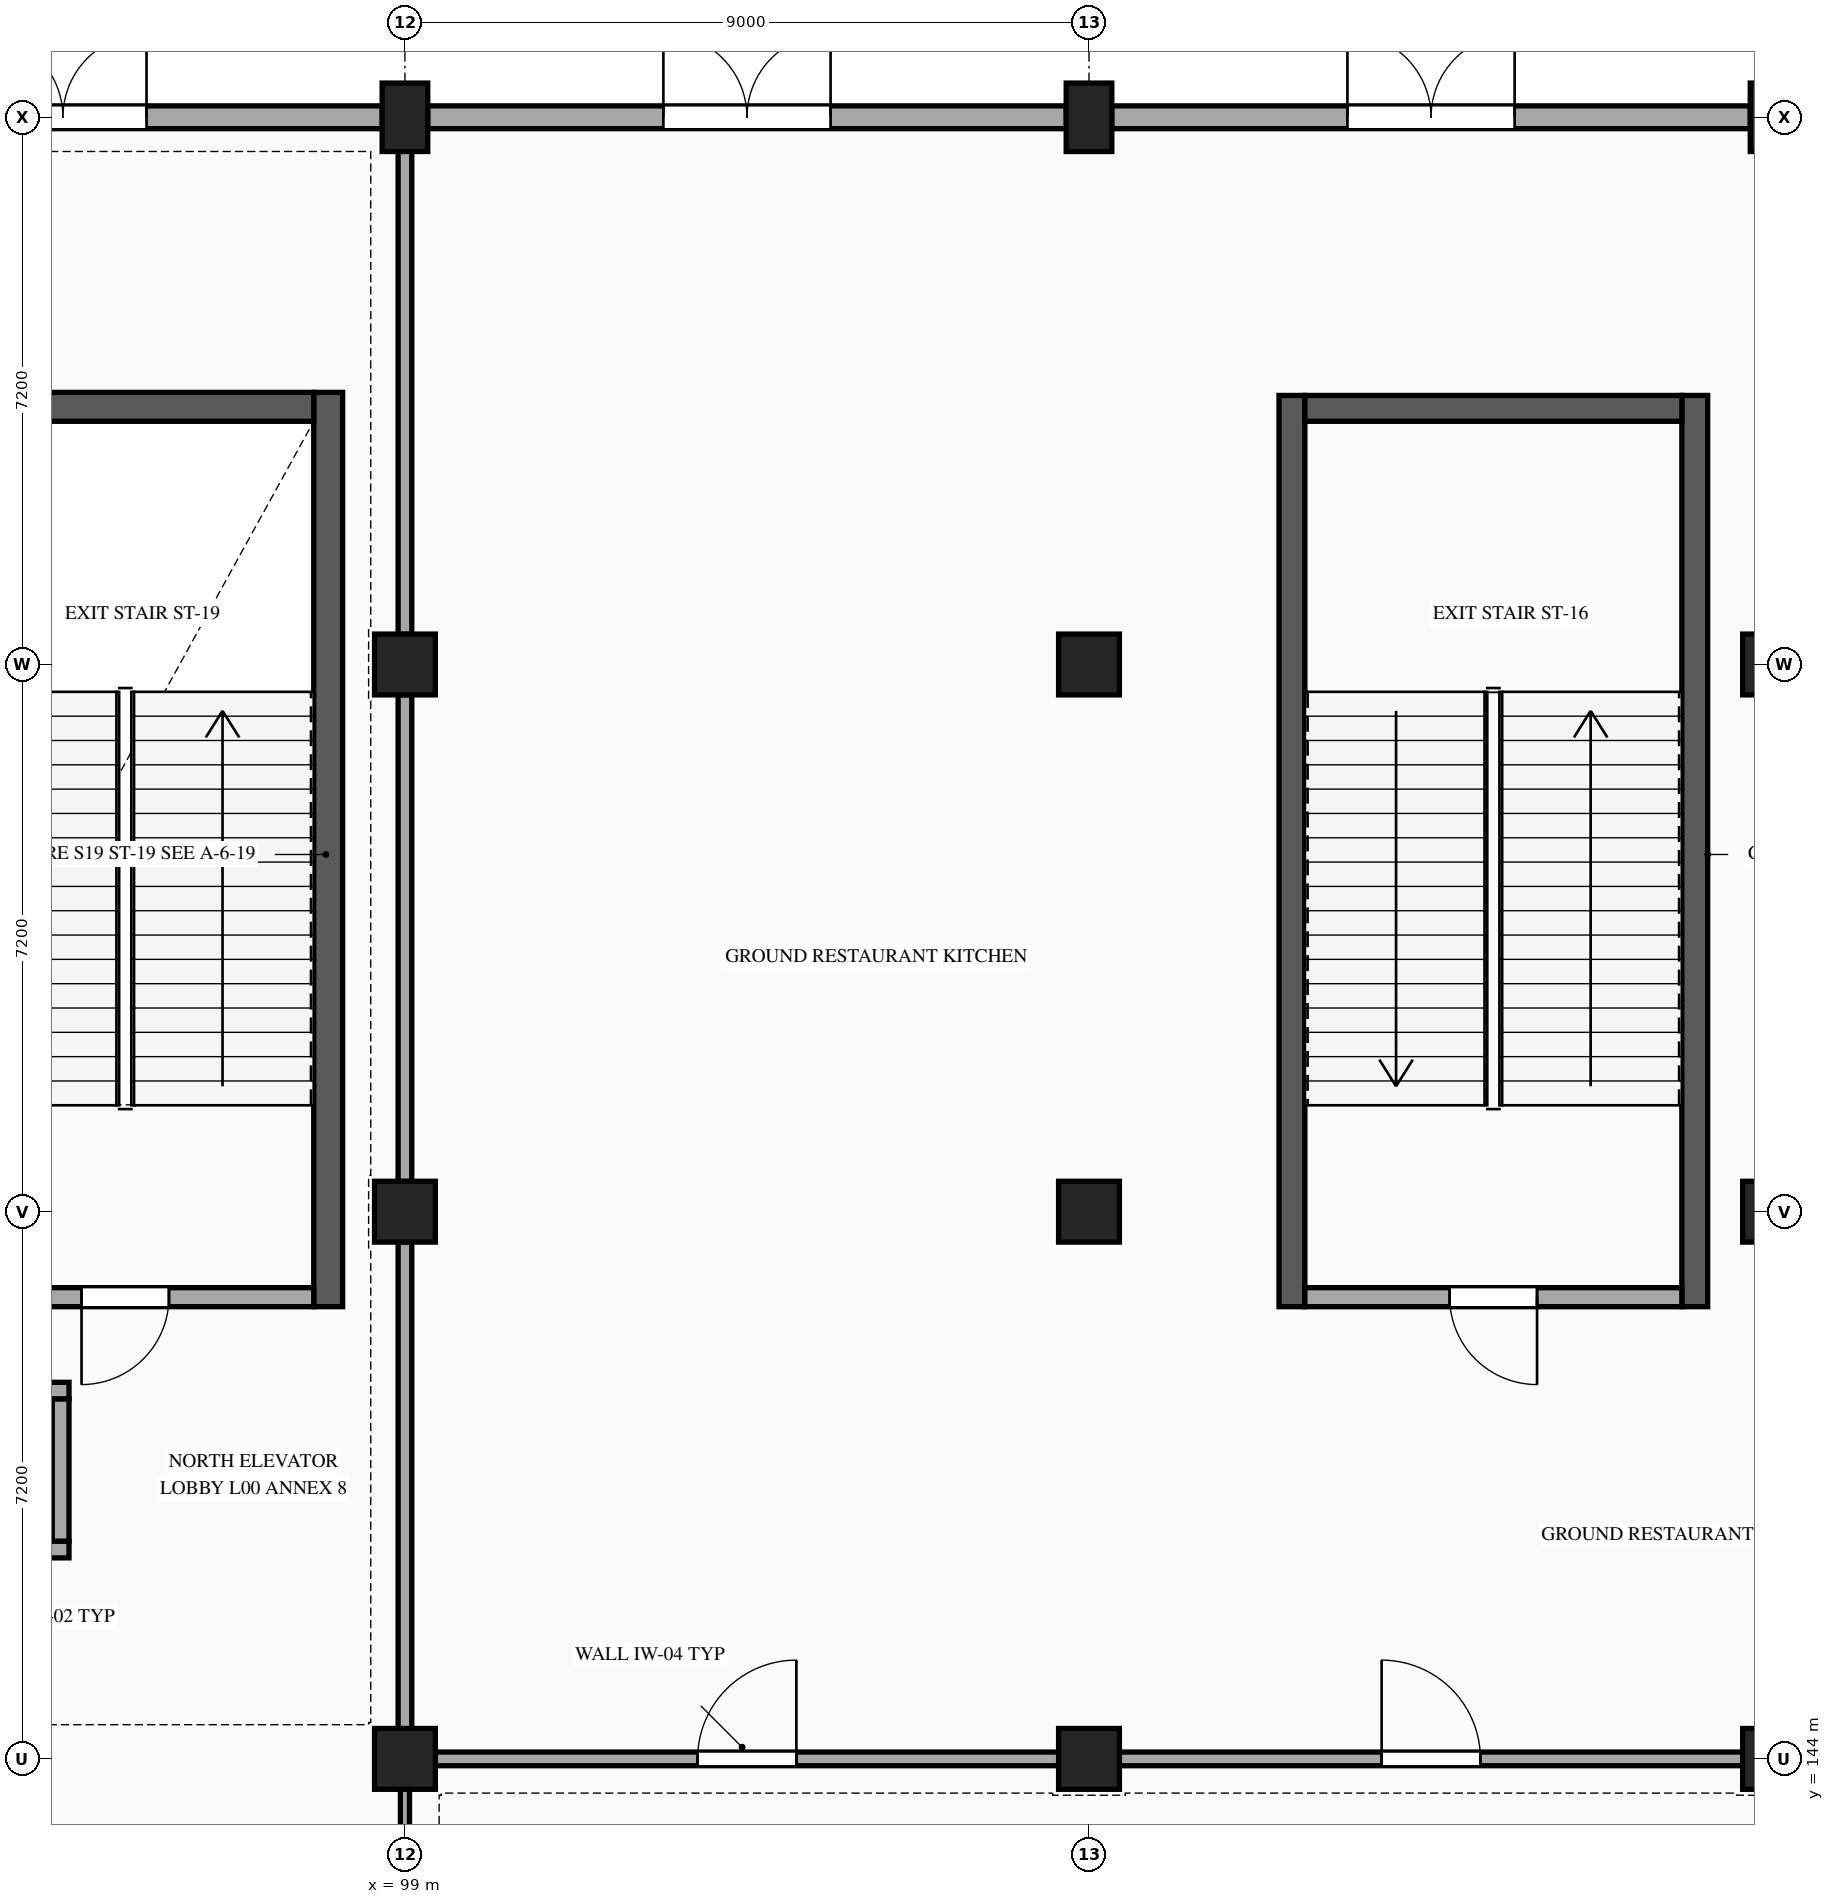
"""IFC4 building model, lengths in metres.
Left out: names, types, materials, properties, quantities, classifications, styles, units other than length and angle.
Written with IfcOpenShell. Run it as: python <this file> out.ifc"""

import sys

from ifc_helpers import new_model, si_unit, direction, frame, frame_2d, origin, origin_2d, place, context, subcontext, project, spatial, rectangle, extrude, element, fill, save


model = new_model("IFC4")
c1 = context("Model", 3, precision=1e-05, world=origin(), true_north=direction((0.0, 1.0)))
c2 = subcontext(c1, "Body", "Model", "MODEL_VIEW")
j1 = project(units=[si_unit("LENGTHUNIT", "METRE"), si_unit("PLANEANGLEUNIT", "RADIAN")], contexts=[c1])
p1 = place(None, origin())
s1 = spatial("IfcSite", under=j1, at=p1, CompositionType="ELEMENT")
p2 = place(p1, origin())
s2 = spatial("IfcBuilding", under=s1, at=p2, CompositionType="ELEMENT")
p3 = place(p2, origin())
s3 = spatial("IfcBuildingStorey", under=s2, at=p3, CompositionType="ELEMENT", Elevation=0.0)
for number, where, z_axis, x_axis in (
    (1, (99.0, 144.0, 0.0), (0.0, 0.0, 1.0), (1.0, 0.0, 0.0)),
    (2, (99.0, 151.2, 0.0), (0.0, 0.0, 1.0), (1.0, 0.0, 0.0)),
    (3, (99.0, 158.4, 0.0), (0.0, 0.0, 1.0), (1.0, 0.0, 0.0)),
):
    element("IfcColumn", number, at=place(p3, frame(where, z_axis=z_axis, x_axis=x_axis)), inside=s3, PredefinedType="COLUMN", context=c2, shape_type="SweptSolid", body=[
        extrude(rectangle(XDim=0.8, YDim=0.8, at=origin_2d()), origin(), (0.0, 0.0, 1.0), 5.4),
    ])
p4 = place(p3, frame((99.0, 165.6, 0.0), z_axis=(0.0, 0.0, 1.0), x_axis=(1.0, 0.0, 0.0)))
e4 = element("IfcColumn", 4, at=p4, inside=s3, PredefinedType="COLUMN", context=c2, shape_type="SweptSolid", body=[
    extrude(rectangle(XDim=0.6, YDim=0.9, at=origin_2d()), origin(), (0.0, 0.0, 1.0), 5.4),
])
for number, where, z_axis, x_axis in (
    (5, (108.0, 144.0, 0.0), (0.0, 0.0, 1.0), (1.0, 0.0, 0.0)),
    (6, (108.0, 151.2, 0.0), (0.0, 0.0, 1.0), (1.0, 0.0, 0.0)),
    (7, (108.0, 158.4, 0.0), (0.0, 0.0, 1.0), (1.0, 0.0, 0.0)),
):
    element("IfcColumn", number, at=place(p3, frame(where, z_axis=z_axis, x_axis=x_axis)), inside=s3, PredefinedType="COLUMN", context=c2, shape_type="SweptSolid", body=[
        extrude(rectangle(XDim=0.8, YDim=0.8, at=origin_2d()), origin(), (0.0, 0.0, 1.0), 5.4),
    ])
p5 = place(p3, frame((108.0, 165.6, 0.0), z_axis=(0.0, 0.0, 1.0), x_axis=(1.0, 0.0, 0.0)))
e8 = element("IfcColumn", 8, at=p5, inside=s3, PredefinedType="COLUMN", context=c2, shape_type="SweptSolid", body=[
    extrude(rectangle(XDim=0.6, YDim=0.9, at=origin_2d()), origin(), (0.0, 0.0, 1.0), 5.4),
])
for number, where, z_axis, x_axis in (
    (9, (117.0, 144.0, 0.0), (0.0, 0.0, 1.0), (1.0, 0.0, 0.0)),
    (10, (117.0, 151.2, 0.0), (0.0, 0.0, 1.0), (1.0, 0.0, 0.0)),
    (11, (117.0, 158.4, 0.0), (0.0, 0.0, 1.0), (1.0, 0.0, 0.0)),
):
    element("IfcColumn", number, at=place(p3, frame(where, z_axis=z_axis, x_axis=x_axis)), inside=s3, PredefinedType="COLUMN", context=c2, shape_type="SweptSolid", body=[
        extrude(rectangle(XDim=0.8, YDim=0.8, at=origin_2d()), origin(), (0.0, 0.0, 1.0), 5.4),
    ])
p6 = place(p3, frame((117.0, 165.6, 0.0), z_axis=(0.0, 0.0, 1.0), x_axis=(1.0, 0.0, 0.0)))
e12 = element("IfcColumn", 12, at=p6, inside=s3, PredefinedType="COLUMN", context=c2, shape_type="SweptSolid", body=[
    extrude(rectangle(XDim=0.6, YDim=0.9, at=origin_2d()), origin(), (0.0, 0.0, 1.0), 5.4),
])
for number, where, z_axis, x_axis in (
    (13, (110.67, 149.95, 0.0), (0.0, 0.0, 1.0), (0.0, 1.0, 0.0)),
    (14, (115.97, 161.94, 0.0), (0.0, 0.0, 1.0), (0.0, -1.0, 0.0)),
):
    element("IfcWall", number, at=place(p3, frame(where, z_axis=z_axis, x_axis=x_axis)), inside=s3, PredefinedType="SHEAR", context=c2, shape_type="SweptSolid", body=[
        extrude(rectangle(XDim=11.99, YDim=0.34, at=frame_2d((5.995, 0.0))), origin(), (0.0, 0.0, 1.0), 5.12),
    ])
p7 = place(p3, frame((110.84, 161.77, 0.0), z_axis=(0.0, 0.0, 1.0), x_axis=(1.0, 0.0, 0.0)))
e15 = element("IfcWall", 15, at=p7, inside=s3, PredefinedType="SHEAR", context=c2, shape_type="SweptSolid", body=[
    extrude(rectangle(XDim=4.96, YDim=0.34, at=frame_2d((2.48, 0.0))), origin(), (0.0, 0.0, 1.0), 5.12),
])
p8 = place(p3, frame((97.99, 161.98, 0.0), z_axis=(0.0, 0.0, 1.0), x_axis=(0.0, -1.0, 0.0)))
e16 = element("IfcWall", 16, at=p8, inside=s3, PredefinedType="SHEAR", context=c2, shape_type="SweptSolid", body=[
    extrude(rectangle(XDim=12.03, YDim=0.38, at=frame_2d((6.015, 0.0))), origin(), (0.0, 0.0, 1.0), 5.12),
])
p9 = place(p3, frame((92.84, 161.79, 0.0), z_axis=(0.0, 0.0, 1.0), x_axis=(1.0, 0.0, 0.0)))
e17 = element("IfcWall", 17, at=p9, inside=s3, PredefinedType="SHEAR", context=c2, shape_type="SweptSolid", body=[
    extrude(rectangle(XDim=4.96, YDim=0.38, at=frame_2d((2.48, 0.0))), origin(), (0.0, 0.0, 1.0), 5.12),
])
p10 = place(p3, frame((90.298, 165.6, 0.0), z_axis=(0.0, 0.0, 1.0), x_axis=(1.0, 0.0, 0.0)))
e18 = element("IfcWall", 18, at=p10, inside=s3, PredefinedType="STANDARD", context=c2, shape_type="SweptSolid", body=[
    extrude(rectangle(XDim=8.404, YDim=0.3, at=frame_2d((4.202, 0.0))), origin(), (0.0, 0.0, 1.0), 4.747),
])
p11 = place(p10, frame((3.102, 0.0, 0.0)))
e19 = element("IfcOpeningElement", 19, at=p11, cuts=e18, PredefinedType="OPENING", context=c2, shape_type="SweptSolid", body=[
    extrude(rectangle(XDim=2.2, YDim=2.4, at=frame_2d((1.1, 1.2))), frame((0.0, 0.16, 0.0), z_axis=(0.0, -1.0, 0.0), x_axis=(1.0, 0.0, 0.0)), (0.0, 0.0, 1.0), 0.32),
])
p12 = place(p3, frame((99.298, 165.6, 0.0), z_axis=(0.0, 0.0, 1.0), x_axis=(1.0, 0.0, 0.0)))
e20 = element("IfcWall", 20, at=p12, inside=s3, PredefinedType="STANDARD", context=c2, shape_type="SweptSolid", body=[
    extrude(rectangle(XDim=8.404, YDim=0.3, at=frame_2d((4.202, 0.0))), origin(), (0.0, 0.0, 1.0), 4.747),
])
p13 = place(p12, frame((3.102, 0.0, 0.0)))
e21 = element("IfcOpeningElement", 21, at=p13, cuts=e20, PredefinedType="OPENING", context=c2, shape_type="SweptSolid", body=[
    extrude(rectangle(XDim=2.2, YDim=2.4, at=frame_2d((1.1, 1.2))), frame((0.0, 0.16, 0.0), z_axis=(0.0, -1.0, 0.0), x_axis=(1.0, 0.0, 0.0)), (0.0, 0.0, 1.0), 0.32),
])
p14 = place(p3, frame((108.298, 165.6, 0.0), z_axis=(0.0, 0.0, 1.0), x_axis=(1.0, 0.0, 0.0)))
e22 = element("IfcWall", 22, at=p14, inside=s3, PredefinedType="STANDARD", context=c2, shape_type="SweptSolid", body=[
    extrude(rectangle(XDim=8.404, YDim=0.3, at=frame_2d((4.202, 0.0))), origin(), (0.0, 0.0, 1.0), 4.747),
])
p15 = place(p14, frame((3.102, 0.0, 0.0)))
e23 = element("IfcOpeningElement", 23, at=p15, cuts=e22, PredefinedType="OPENING", context=c2, shape_type="SweptSolid", body=[
    extrude(rectangle(XDim=2.2, YDim=2.4, at=frame_2d((1.1, 1.2))), frame((0.0, 0.16, 0.0), z_axis=(0.0, -1.0, 0.0), x_axis=(1.0, 0.0, 0.0)), (0.0, 0.0, 1.0), 0.32),
])
for number, where, z_axis, x_axis in (
    (24, (91.82, 146.755, 0.0), (0.0, 0.0, 1.0), (1.0, 0.0, 0.0)),
    (25, (94.58, 148.845, 0.0), (0.0, 0.0, 1.0), (-1.0, 0.0, 0.0)),
):
    element("IfcWall", number, at=place(p3, frame(where, z_axis=z_axis, x_axis=x_axis)), inside=s3, PredefinedType="STANDARD", context=c2, shape_type="SweptSolid", body=[
        extrude(rectangle(XDim=2.76, YDim=0.22, at=frame_2d((1.38, 0.0))), origin(), (0.0, 0.0, 1.0), 5.08),
    ])
p16 = place(p3, frame((94.47, 146.865, 0.0), z_axis=(0.0, 0.0, 1.0), x_axis=(0.0, 1.0, 0.0)))
e26 = element("IfcWall", 26, at=p16, inside=s3, PredefinedType="STANDARD", context=c2, shape_type="SweptSolid", body=[
    extrude(rectangle(XDim=1.87, YDim=0.22, at=frame_2d((0.935, 0.0))), origin(), (0.0, 0.0, 1.0), 5.08),
])
p17 = place(p3, frame((115.8, 150.075, 0.0), z_axis=(0.0, 0.0, 1.0), x_axis=(-1.0, 0.0, 0.0)))
e27 = element("IfcWall", 27, at=p17, inside=s3, PredefinedType="STANDARD", context=c2, shape_type="SweptSolid", body=[
    extrude(rectangle(XDim=4.96, YDim=0.25, at=frame_2d((2.48, 0.0))), origin(), (0.0, 0.0, 1.0), 5.08),
])
p18 = place(p17, frame((1.905, 0.0, 0.0)))
e28 = element("IfcOpeningElement", 28, at=p18, cuts=e27, PredefinedType="OPENING", context=c2, shape_type="SweptSolid", body=[
    extrude(rectangle(XDim=1.15, YDim=2.2, at=frame_2d((0.575, 1.1))), frame((0.0, 0.135, 0.0), z_axis=(0.0, -1.0, 0.0), x_axis=(1.0, 0.0, 0.0)), (0.0, 0.0, 1.0), 0.27),
])
p19 = place(p3, frame((97.8, 150.075, 0.0), z_axis=(0.0, 0.0, 1.0), x_axis=(-1.0, 0.0, 0.0)))
e29 = element("IfcWall", 29, at=p19, inside=s3, PredefinedType="STANDARD", context=c2, shape_type="SweptSolid", body=[
    extrude(rectangle(XDim=4.96, YDim=0.25, at=frame_2d((2.48, 0.0))), origin(), (0.0, 0.0, 1.0), 5.08),
])
p20 = place(p19, frame((1.905, 0.0, 0.0)))
e30 = element("IfcOpeningElement", 30, at=p20, cuts=e29, PredefinedType="OPENING", context=c2, shape_type="SweptSolid", body=[
    extrude(rectangle(XDim=1.15, YDim=2.2, at=frame_2d((0.575, 1.1))), frame((0.0, 0.135, 0.0), z_axis=(0.0, -1.0, 0.0), x_axis=(1.0, 0.0, 0.0)), (0.0, 0.0, 1.0), 0.27),
])
p21 = place(p3, frame((99.398, 144.0, 0.0), z_axis=(0.0, 0.0, 1.0), x_axis=(1.0, 0.0, 0.0)))
e31 = element("IfcWall", 31, at=p21, inside=s3, PredefinedType="PARTITIONING", context=c2, shape_type="SweptSolid", body=[
    extrude(rectangle(XDim=8.204, YDim=0.18, at=frame_2d((4.102, 0.0))), origin(), (0.0, 0.0, 1.0), 4.424),
])
p22 = place(p21, frame((3.452, 0.0, 0.0)))
e32 = element("IfcOpeningElement", 32, at=p22, cuts=e31, PredefinedType="OPENING", context=c2, shape_type="SweptSolid", body=[
    extrude(rectangle(XDim=1.3, YDim=2.2, at=frame_2d((0.65, 1.1))), frame((0.0, 0.1, 0.0), z_axis=(0.0, -1.0, 0.0), x_axis=(1.0, 0.0, 0.0)), (0.0, 0.0, 1.0), 0.2),
])
p23 = place(p3, frame((108.398, 144.0, 0.0), z_axis=(0.0, 0.0, 1.0), x_axis=(1.0, 0.0, 0.0)))
e33 = element("IfcWall", 33, at=p23, inside=s3, PredefinedType="PARTITIONING", context=c2, shape_type="SweptSolid", body=[
    extrude(rectangle(XDim=8.204, YDim=0.18, at=frame_2d((4.102, 0.0))), origin(), (0.0, 0.0, 1.0), 4.424),
])
p24 = place(p23, frame((3.452, 0.0, 0.0)))
e34 = element("IfcOpeningElement", 34, at=p24, cuts=e33, PredefinedType="OPENING", context=c2, shape_type="SweptSolid", body=[
    extrude(rectangle(XDim=1.3, YDim=2.2, at=frame_2d((0.65, 1.1))), frame((0.0, 0.1, 0.0), z_axis=(0.0, -1.0, 0.0), x_axis=(1.0, 0.0, 0.0)), (0.0, 0.0, 1.0), 0.2),
])
p25 = place(p3, frame((99.0, 137.198, 0.0), z_axis=(0.0, 0.0, 1.0), x_axis=(0.0, 1.0, 0.0)))
e35 = element("IfcWall", 35, at=p25, inside=s3, PredefinedType="PARTITIONING", context=c2, shape_type="SweptSolid", body=[
    extrude(rectangle(XDim=6.404, YDim=0.12, at=frame_2d((3.202, 0.0))), origin(), (0.0, 0.0, 1.0), 4.437),
])
for number, where, z_axis, x_axis in (
    (36, (99.0, 144.398, 0.0), (0.0, 0.0, 1.0), (0.0, 1.0, 0.0)),
    (37, (99.0, 151.598, 0.0), (0.0, 0.0, 1.0), (0.0, 1.0, 0.0)),
):
    element("IfcWall", number, at=place(p3, frame(where, z_axis=z_axis, x_axis=x_axis)), inside=s3, PredefinedType="PARTITIONING", context=c2, shape_type="SweptSolid", body=[
        extrude(rectangle(XDim=6.404, YDim=0.18, at=frame_2d((3.202, 0.0))), origin(), (0.0, 0.0, 1.0), 4.437),
    ])
p26 = place(p3, frame((99.0, 158.798, 0.0), z_axis=(0.0, 0.0, 1.0), x_axis=(0.0, 1.0, 0.0)))
e38 = element("IfcWall", 38, at=p26, inside=s3, PredefinedType="PARTITIONING", context=c2, shape_type="SweptSolid", body=[
    extrude(rectangle(XDim=6.354, YDim=0.18, at=frame_2d((3.177, 0.0))), origin(), (0.0, 0.0, 1.0), 4.437),
])
p27 = place(p11, origin())
e39 = element("IfcDoor", 39, at=p27, inside=s3, OperationType="DOUBLE_DOOR_SINGLE_SWING", PredefinedType="DOOR", context=c2, shape_type="SweptSolid", body=[
    extrude(rectangle(XDim=2.2, YDim=2.4, at=frame_2d((1.1, 1.2))), frame((0.0, 0.025, 0.0), z_axis=(0.0, -1.0, 0.0), x_axis=(1.0, 0.0, 0.0)), (0.0, 0.0, 1.0), 0.05),
])
fill(e19, e39)
p28 = place(p13, origin())
e40 = element("IfcDoor", 40, at=p28, inside=s3, OperationType="DOUBLE_DOOR_SINGLE_SWING", PredefinedType="DOOR", context=c2, shape_type="SweptSolid", body=[
    extrude(rectangle(XDim=2.2, YDim=2.4, at=frame_2d((1.1, 1.2))), frame((0.0, 0.025, 0.0), z_axis=(0.0, -1.0, 0.0), x_axis=(1.0, 0.0, 0.0)), (0.0, 0.0, 1.0), 0.05),
])
fill(e21, e40)
p29 = place(p15, origin())
e41 = element("IfcDoor", 41, at=p29, inside=s3, OperationType="DOUBLE_DOOR_SINGLE_SWING", PredefinedType="DOOR", context=c2, shape_type="SweptSolid", body=[
    extrude(rectangle(XDim=2.2, YDim=2.4, at=frame_2d((1.1, 1.2))), frame((0.0, 0.025, 0.0), z_axis=(0.0, -1.0, 0.0), x_axis=(1.0, 0.0, 0.0)), (0.0, 0.0, 1.0), 0.05),
])
fill(e23, e41)
p30 = place(p18, origin())
e42 = element("IfcDoor", 42, at=p30, inside=s3, OperationType="SINGLE_SWING_LEFT", PredefinedType="DOOR", context=c2, shape_type="SweptSolid", body=[
    extrude(rectangle(XDim=1.15, YDim=2.2, at=frame_2d((0.575, 1.1))), frame((0.0, 0.025, 0.0), z_axis=(0.0, -1.0, 0.0), x_axis=(1.0, 0.0, 0.0)), (0.0, 0.0, 1.0), 0.05),
])
fill(e28, e42)
p31 = place(p20, origin())
e43 = element("IfcDoor", 43, at=p31, inside=s3, OperationType="SINGLE_SWING_RIGHT", PredefinedType="DOOR", context=c2, shape_type="SweptSolid", body=[
    extrude(rectangle(XDim=1.15, YDim=2.2, at=frame_2d((0.575, 1.1))), frame((0.0, 0.025, 0.0), z_axis=(0.0, -1.0, 0.0), x_axis=(1.0, 0.0, 0.0)), (0.0, 0.0, 1.0), 0.05),
])
fill(e30, e43)
p32 = place(p22, origin())
e44 = element("IfcDoor", 44, at=p32, inside=s3, OperationType="SINGLE_SWING_RIGHT", PredefinedType="DOOR", context=c2, shape_type="SweptSolid", body=[
    extrude(rectangle(XDim=1.3, YDim=2.2, at=frame_2d((0.65, 1.1))), frame((0.0, 0.025, 0.0), z_axis=(0.0, -1.0, 0.0), x_axis=(1.0, 0.0, 0.0)), (0.0, 0.0, 1.0), 0.05),
])
fill(e32, e44)
p33 = place(p24, origin())
e45 = element("IfcDoor", 45, at=p33, inside=s3, OperationType="SINGLE_SWING_LEFT", PredefinedType="DOOR", context=c2, shape_type="SweptSolid", body=[
    extrude(rectangle(XDim=1.3, YDim=2.2, at=frame_2d((0.65, 1.1))), frame((0.0, 0.025, 0.0), z_axis=(0.0, -1.0, 0.0), x_axis=(1.0, 0.0, 0.0)), (0.0, 0.0, 1.0), 0.05),
])
fill(e34, e45)
save(model, sys.argv[1])
